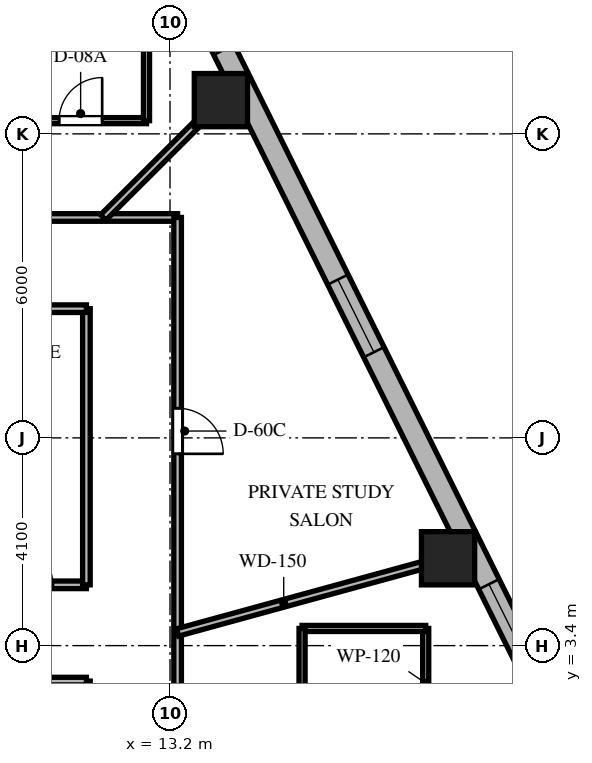
"""IFC4 building model, lengths in metres.
Left out: names, types, materials, properties, quantities, classifications, styles, units other than length and angle.
Written with IfcOpenShell. Run it as: python <this file> out.ifc"""

import sys

from ifc_helpers import new_model, si_unit, direction, frame, frame_2d, origin, origin_2d, place, context, subcontext, project, spatial, rectangle, extrude, element, fill, save


model = new_model("IFC4")
c1 = context("Model", 3, precision=1e-05, world=origin(), true_north=direction((0.0, 1.0)))
c2 = subcontext(c1, "Body", "Model", "MODEL_VIEW")
j1 = project(units=[si_unit("LENGTHUNIT", "METRE"), si_unit("PLANEANGLEUNIT", "RADIAN")], contexts=[c1])
p1 = place(None, origin())
s1 = spatial("IfcSite", under=j1, at=p1, CompositionType="ELEMENT")
p2 = place(p1, origin())
s2 = spatial("IfcBuilding", under=s1, at=p2, CompositionType="ELEMENT")
p3 = place(p2, frame((0.0, 0.0, 197.8)))
s3 = spatial("IfcBuildingStorey", under=s2, at=p3, CompositionType="ELEMENT", Elevation=197.8)
for number, where, z_axis, x_axis in (
    (1, (18.687, 5.124, 0.0), (0.0, 0.0, 1.0), (1.0, 0.0, 0.0)),
    (2, (14.204, 14.166, 0.0), (0.0, 0.0, 1.0), (1.0, 0.0, 0.0)),
):
    element("IfcColumn", number, at=place(p3, frame(where, z_axis=z_axis, x_axis=x_axis)), inside=s3, PredefinedType="COLUMN", context=c2, shape_type="SweptSolid", body=[
        extrude(rectangle(XDim=1.05, YDim=1.05, at=origin_2d()), origin(), (0.0, 0.0, 1.0), 3.7),
    ])
p4 = place(p3, frame((20.618, 2.344, 0.0), z_axis=(0.0, 0.0, 1.0), x_axis=(-0.444243691097, 0.895905990002, 0.0)))
e3 = element("IfcWall", 3, at=p4, inside=s3, PredefinedType="SOLIDWALL", context=c2, shape_type="SweptSolid", body=[
    extrude(rectangle(XDim=16.784, YDim=0.45, at=frame_2d((8.392, 0.0))), origin(), (0.0, 0.0, 1.0), 3.35),
])
p5 = place(p4, frame((0.931, 0.0, 0.8)))
e4 = element("IfcOpeningElement", 4, at=p5, cuts=e3, PredefinedType="OPENING", context=c2, shape_type="SweptSolid", body=[
    extrude(rectangle(XDim=1.6, YDim=1.75, at=frame_2d((0.8, 0.875))), frame((0.0, 0.235, 0.0), z_axis=(0.0, -1.0, 0.0), x_axis=(1.0, 0.0, 0.0)), (0.0, 0.0, 1.0), 0.47),
])
p6 = place(p4, frame((7.642, 0.0, 0.8)))
e5 = element("IfcOpeningElement", 5, at=p6, cuts=e3, PredefinedType="OPENING", context=c2, shape_type="SweptSolid", body=[
    extrude(rectangle(XDim=1.6, YDim=1.75, at=frame_2d((0.8, 0.875))), frame((0.0, 0.235, 0.0), z_axis=(0.0, -1.0, 0.0), x_axis=(1.0, 0.0, 0.0)), (0.0, 0.0, 1.0), 0.47),
])
p7 = place(p4, frame((14.303, 0.0, 0.8)))
e6 = element("IfcOpeningElement", 6, at=p7, cuts=e3, PredefinedType="OPENING", context=c2, shape_type="SweptSolid", body=[
    extrude(rectangle(XDim=1.6, YDim=1.75, at=frame_2d((0.8, 0.875))), frame((0.0, 0.235, 0.0), z_axis=(0.0, -1.0, 0.0), x_axis=(1.0, 0.0, 0.0)), (0.0, 0.0, 1.0), 0.47),
])
p8 = place(p3, frame((-13.35, 11.85, 0.0), z_axis=(0.0, 0.0, 1.0), x_axis=(1.0, 0.0, 0.0)))
e7 = element("IfcWall", 7, at=p8, inside=s3, PredefinedType="PARTITIONING", context=c2, shape_type="SweptSolid", body=[
    extrude(rectangle(XDim=26.7, YDim=0.15, at=frame_2d((13.35, 0.0))), origin(), (0.0, 0.0, 1.0), 2.79),
])
p9 = place(p8, frame((22.201, 0.0, 0.0)))
e8 = element("IfcOpeningElement", 8, at=p9, cuts=e7, PredefinedType="OPENING", context=c2, shape_type="SweptSolid", body=[
    extrude(rectangle(XDim=0.95, YDim=2.03, at=frame_2d((0.475, 1.015))), frame((0.0, 0.085, 0.0), z_axis=(0.0, -1.0, 0.0), x_axis=(1.0, 0.0, 0.0)), (0.0, 0.0, 1.0), 0.17),
])
p10 = place(p8, frame((18.069, 0.0, 0.0)))
e9 = element("IfcOpeningElement", 9, at=p10, cuts=e7, PredefinedType="OPENING", context=c2, shape_type="SweptSolid", body=[
    extrude(rectangle(XDim=0.9, YDim=2.03, at=frame_2d((0.45, 1.015))), frame((0.0, 0.085, 0.0), z_axis=(0.0, -1.0, 0.0), x_axis=(1.0, 0.0, 0.0)), (0.0, 0.0, 1.0), 0.17),
])
p11 = place(p8, frame((12.362, 0.0, 0.0)))
e10 = element("IfcOpeningElement", 10, at=p11, cuts=e7, PredefinedType="OPENING", context=c2, shape_type="SweptSolid", body=[
    extrude(rectangle(XDim=0.95, YDim=2.03, at=frame_2d((0.475, 1.015))), frame((0.0, 0.085, 0.0), z_axis=(0.0, -1.0, 0.0), x_axis=(1.0, 0.0, 0.0)), (0.0, 0.0, 1.0), 0.17),
])
p12 = place(p8, frame((3.995, 0.0, 0.0)))
e11 = element("IfcOpeningElement", 11, at=p12, cuts=e7, PredefinedType="OPENING", context=c2, shape_type="SweptSolid", body=[
    extrude(rectangle(XDim=0.95, YDim=2.03, at=frame_2d((0.475, 1.015))), frame((0.0, 0.085, 0.0), z_axis=(0.0, -1.0, 0.0), x_axis=(1.0, 0.0, 0.0)), (0.0, 0.0, 1.0), 0.17),
])
p13 = place(p3, frame((13.35, 11.85, 0.0), z_axis=(0.0, 0.0, 1.0), x_axis=(0.0, -1.0, 0.0)))
e12 = element("IfcWall", 12, at=p13, inside=s3, PredefinedType="PARTITIONING", context=c2, shape_type="SweptSolid", body=[
    extrude(rectangle(XDim=23.7, YDim=0.15, at=frame_2d((11.85, 0.0))), origin(), (0.0, 0.0, 1.0), 2.79),
])
p14 = place(p13, frame((9.424, 0.0, 0.0)))
e13 = element("IfcOpeningElement", 13, at=p14, cuts=e12, PredefinedType="OPENING", context=c2, shape_type="SweptSolid", body=[
    extrude(rectangle(XDim=0.95, YDim=2.03, at=frame_2d((0.475, 1.015))), frame((0.0, 0.085, 0.0), z_axis=(0.0, -1.0, 0.0), x_axis=(1.0, 0.0, 0.0)), (0.0, 0.0, 1.0), 0.17),
])
p15 = place(p13, frame((3.765, 0.0, 0.0)))
e14 = element("IfcOpeningElement", 14, at=p15, cuts=e12, PredefinedType="OPENING", context=c2, shape_type="SweptSolid", body=[
    extrude(rectangle(XDim=0.9, YDim=2.03, at=frame_2d((0.45, 1.015))), frame((0.0, 0.085, 0.0), z_axis=(0.0, -1.0, 0.0), x_axis=(1.0, 0.0, 0.0)), (0.0, 0.0, 1.0), 0.17),
])
p16 = place(p13, frame((12.494, 0.0, 0.0)))
e15 = element("IfcOpeningElement", 15, at=p16, cuts=e12, PredefinedType="OPENING", context=c2, shape_type="SweptSolid", body=[
    extrude(rectangle(XDim=0.9, YDim=2.03, at=frame_2d((0.45, 1.015))), frame((0.0, 0.085, 0.0), z_axis=(0.0, -1.0, 0.0), x_axis=(1.0, 0.0, 0.0)), (0.0, 0.0, 1.0), 0.17),
])
p17 = place(p3, frame((11.55, -10.05, 0.0), z_axis=(0.0, 0.0, 1.0), x_axis=(0.0, 1.0, 0.0)))
e16 = element("IfcWall", 16, at=p17, inside=s3, PredefinedType="PARTITIONING", context=c2, shape_type="SweptSolid", body=[
    extrude(rectangle(XDim=12.75, YDim=0.15, at=frame_2d((6.375, 0.0))), origin(), (0.0, 0.0, 1.0), 2.79),
])
p18 = place(p17, frame((5.95, 0.0, 0.0)))
e17 = element("IfcOpeningElement", 17, at=p18, cuts=e16, PredefinedType="OPENING", context=c2, shape_type="SweptSolid", body=[
    extrude(rectangle(XDim=0.85, YDim=2.03, at=frame_2d((0.425, 1.015))), frame((0.0, 0.085, 0.0), z_axis=(0.0, -1.0, 0.0), x_axis=(1.0, 0.0, 0.0)), (0.0, 0.0, 1.0), 0.17),
])
p19 = place(p3, frame((11.55, 2.7, 0.0), z_axis=(0.0, 0.0, 1.0), x_axis=(-1.0, 0.0, 0.0)))
e18 = element("IfcWall", 18, at=p19, inside=s3, PredefinedType="PARTITIONING", context=c2, shape_type="SweptSolid", body=[
    extrude(rectangle(XDim=2.175, YDim=0.15, at=frame_2d((1.087, 0.0))), origin(), (0.0, 0.0, 1.0), 3.35),
])
p20 = place(p3, frame((9.375, 4.6, 0.0), z_axis=(0.0, 0.0, 1.0), x_axis=(1.0, 0.0, 0.0)))
e19 = element("IfcWall", 19, at=p20, inside=s3, PredefinedType="PARTITIONING", context=c2, shape_type="SweptSolid", body=[
    extrude(rectangle(XDim=2.175, YDim=0.15, at=frame_2d((1.087, 0.0))), origin(), (0.0, 0.0, 1.0), 3.35),
])
p21 = place(p20, frame((0.663, 0.0, 0.0)))
e20 = element("IfcOpeningElement", 20, at=p21, cuts=e19, PredefinedType="OPENING", context=c2, shape_type="SweptSolid", body=[
    extrude(rectangle(XDim=0.85, YDim=2.03, at=frame_2d((0.425, 1.015))), frame((0.0, 0.085, 0.0), z_axis=(0.0, -1.0, 0.0), x_axis=(1.0, 0.0, 0.0)), (0.0, 0.0, 1.0), 0.17),
])
p22 = place(p3, frame((11.55, 4.6, 0.0), z_axis=(0.0, 0.0, 1.0), x_axis=(0.0, 1.0, 0.0)))
e21 = element("IfcWall", 21, at=p22, inside=s3, PredefinedType="PARTITIONING", context=c2, shape_type="SweptSolid", body=[
    extrude(rectangle(XDim=5.45, YDim=0.15, at=frame_2d((2.725, 0.0))), origin(), (0.0, 0.0, 1.0), 2.79),
])
p23 = place(p3, frame((11.55, 10.05, 0.0), z_axis=(0.0, 0.0, 1.0), x_axis=(-1.0, 0.0, 0.0)))
e22 = element("IfcWall", 22, at=p23, inside=s3, PredefinedType="PARTITIONING", context=c2, shape_type="SweptSolid", body=[
    extrude(rectangle(XDim=9.65, YDim=0.15, at=frame_2d((4.825, 0.0))), origin(), (0.0, 0.0, 1.0), 2.79),
])
p24 = place(p3, frame((13.35, 3.661, 0.0), z_axis=(0.0, 0.0, 1.0), x_axis=(0.964397145454, 0.264458211898, 0.0)))
e23 = element("IfcWall", 23, at=p24, inside=s3, PredefinedType="PARTITIONING", context=c2, shape_type="SweptSolid", body=[
    extrude(rectangle(XDim=6.039, YDim=0.15, at=frame_2d((3.019, 0.0))), origin(), (0.0, 0.0, 1.0), 2.59),
])
p25 = place(p3, frame((11.882, 11.85, 0.0), z_axis=(0.0, 0.0, 1.0), x_axis=(0.708037373639, 0.706174962407, 0.0)))
e24 = element("IfcWall", 24, at=p25, inside=s3, PredefinedType="PARTITIONING", context=c2, shape_type="SweptSolid", body=[
    extrude(rectangle(XDim=3.802, YDim=0.15, at=frame_2d((1.901, 0.0))), origin(), (0.0, 0.0, 1.0), 2.59),
])
p26 = place(p3, frame((18.246, 1.129, 0.0), z_axis=(0.0, 0.0, 1.0), x_axis=(0.0, 1.0, 0.0)))
e25 = element("IfcWall", 25, at=p26, inside=s3, PredefinedType="PARTITIONING", context=c2, shape_type="SweptSolid", body=[
    extrude(rectangle(XDim=2.61, YDim=0.12, at=frame_2d((1.305, 0.0))), origin(), (0.0, 0.0, 1.0), 3.35),
])
p27 = place(p3, frame((18.246, 3.739, 0.0), z_axis=(0.0, 0.0, 1.0), x_axis=(-1.0, 0.0, 0.0)))
e26 = element("IfcWall", 26, at=p27, inside=s3, PredefinedType="PARTITIONING", context=c2, shape_type="SweptSolid", body=[
    extrude(rectangle(XDim=2.44, YDim=0.12, at=frame_2d((1.22, 0.0))), origin(), (0.0, 0.0, 1.0), 3.35),
])
p28 = place(p3, frame((15.806, 3.739, 0.0), z_axis=(0.0, 0.0, 1.0), x_axis=(0.0, -1.0, 0.0)))
e27 = element("IfcWall", 27, at=p28, inside=s3, PredefinedType="PARTITIONING", context=c2, shape_type="SweptSolid", body=[
    extrude(rectangle(XDim=2.61, YDim=0.12, at=frame_2d((1.305, 0.0))), origin(), (0.0, 0.0, 1.0), 2.791),
])
p29 = place(p3, frame((10.136, 13.761, 0.0), z_axis=(0.0, 0.0, 1.0), x_axis=(1.0, 0.0, 0.0)))
e28 = element("IfcWall", 28, at=p29, inside=s3, PredefinedType="PARTITIONING", context=c2, shape_type="SweptSolid", body=[
    extrude(rectangle(XDim=2.6, YDim=0.12, at=frame_2d((1.3, 0.0))), origin(), (0.0, 0.0, 1.0), 3.35),
])
p30 = place(p29, frame((0.875, 0.0, 0.0)))
e29 = element("IfcOpeningElement", 29, at=p30, cuts=e28, PredefinedType="OPENING", context=c2, shape_type="SweptSolid", body=[
    extrude(rectangle(XDim=0.85, YDim=2.03, at=frame_2d((0.425, 1.015))), frame((0.0, 0.07, 0.0), z_axis=(0.0, -1.0, 0.0), x_axis=(1.0, 0.0, 0.0)), (0.0, 0.0, 1.0), 0.14),
])
p31 = place(p3, frame((12.736, 13.761, 0.0), z_axis=(0.0, 0.0, 1.0), x_axis=(0.0, 1.0, 0.0)))
e30 = element("IfcWall", 30, at=p31, inside=s3, PredefinedType="PARTITIONING", context=c2, shape_type="SweptSolid", body=[
    extrude(rectangle(XDim=2.75, YDim=0.12, at=frame_2d((1.375, 0.0))), origin(), (0.0, 0.0, 1.0), 2.59),
])
p32 = place(p5, origin())
e31 = element("IfcWindow", 31, at=p32, inside=s3, PartitioningType="SINGLE_PANEL", PredefinedType="WINDOW", context=c2, shape_type="SweptSolid", body=[
    extrude(rectangle(XDim=1.6, YDim=1.75, at=frame_2d((0.8, 0.875))), frame((0.0, 0.03, 0.0), z_axis=(0.0, -1.0, 0.0), x_axis=(1.0, 0.0, 0.0)), (0.0, 0.0, 1.0), 0.06),
])
fill(e4, e31)
p33 = place(p6, origin())
e32 = element("IfcWindow", 32, at=p33, inside=s3, PartitioningType="SINGLE_PANEL", PredefinedType="WINDOW", context=c2, shape_type="SweptSolid", body=[
    extrude(rectangle(XDim=1.6, YDim=1.75, at=frame_2d((0.8, 0.875))), frame((0.0, 0.03, 0.0), z_axis=(0.0, -1.0, 0.0), x_axis=(1.0, 0.0, 0.0)), (0.0, 0.0, 1.0), 0.06),
])
fill(e5, e32)
p34 = place(p21, origin())
e33 = element("IfcDoor", 33, at=p34, inside=s3, OperationType="SINGLE_SWING_LEFT", PredefinedType="DOOR", context=c2, shape_type="SweptSolid", body=[
    extrude(rectangle(XDim=0.85, YDim=2.03, at=frame_2d((0.425, 1.015))), frame((0.0, 0.025, 0.0), z_axis=(0.0, -1.0, 0.0), x_axis=(1.0, 0.0, 0.0)), (0.0, 0.0, 1.0), 0.05),
])
fill(e20, e33)
p35 = place(p15, origin())
e34 = element("IfcDoor", 34, at=p35, inside=s3, OperationType="SINGLE_SWING_RIGHT", PredefinedType="DOOR", context=c2, shape_type="SweptSolid", body=[
    extrude(rectangle(XDim=0.9, YDim=2.03, at=frame_2d((0.45, 1.015))), frame((0.0, 0.025, 0.0), z_axis=(0.0, -1.0, 0.0), x_axis=(1.0, 0.0, 0.0)), (0.0, 0.0, 1.0), 0.05),
])
fill(e14, e34)
p36 = place(p30, origin())
e35 = element("IfcDoor", 35, at=p36, inside=s3, OperationType="SINGLE_SWING_RIGHT", PredefinedType="DOOR", context=c2, shape_type="SweptSolid", body=[
    extrude(rectangle(XDim=0.85, YDim=2.03, at=frame_2d((0.425, 1.015))), frame((0.0, 0.025, 0.0), z_axis=(0.0, -1.0, 0.0), x_axis=(1.0, 0.0, 0.0)), (0.0, 0.0, 1.0), 0.05),
])
fill(e29, e35)
save(model, sys.argv[1])
